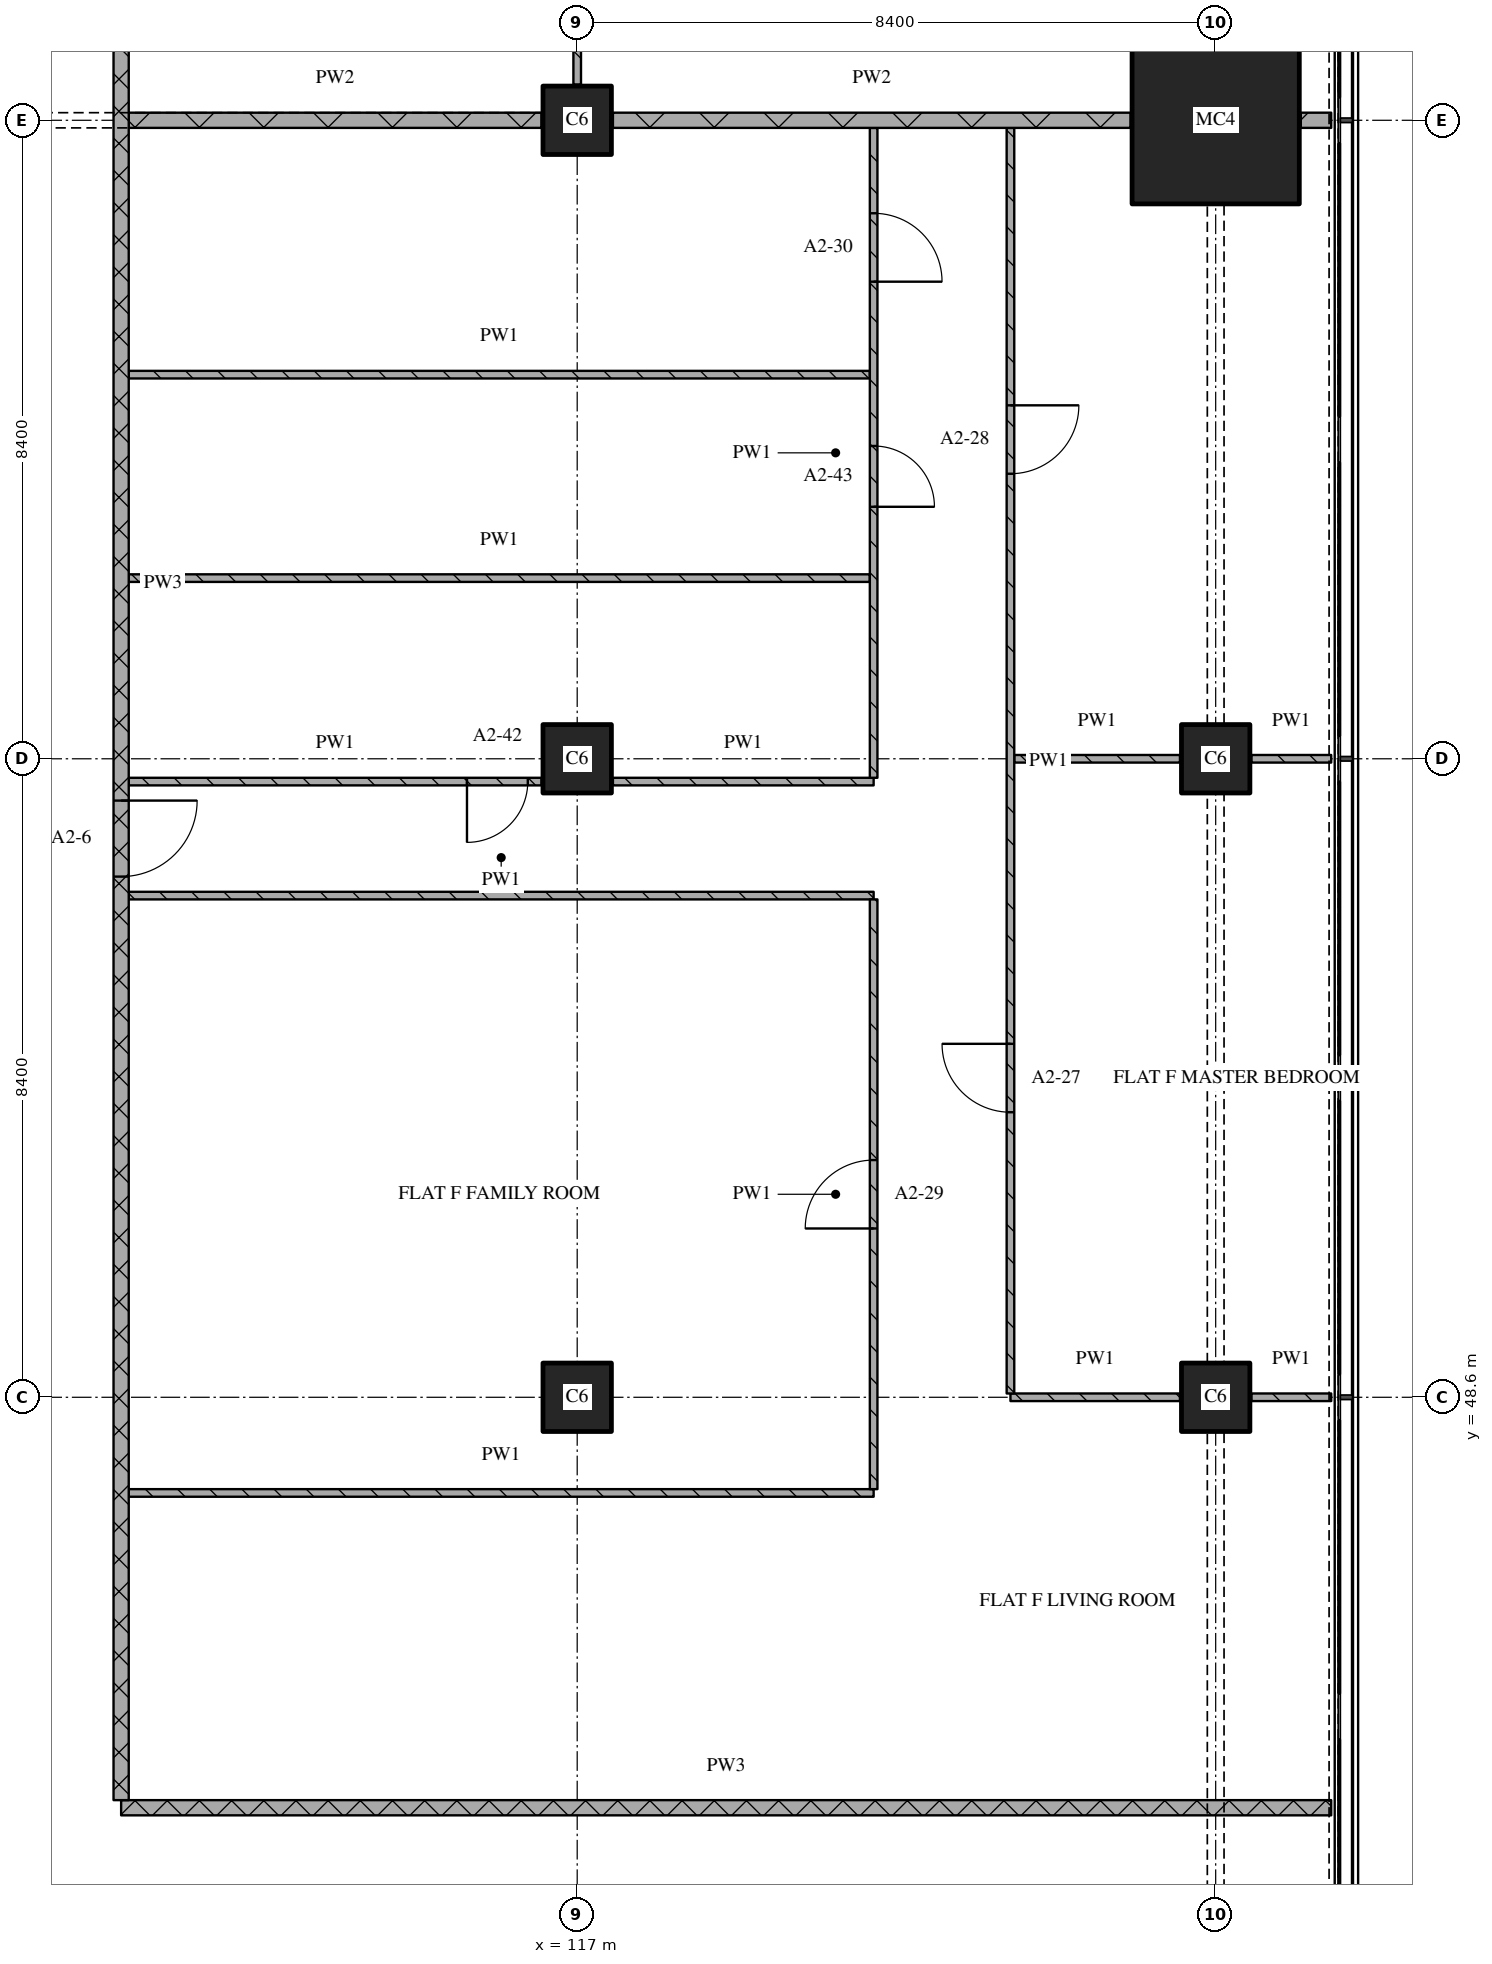
"""IFC4 building model, lengths in metres.
Left out: names, types, materials, properties, quantities, classifications, styles, units other than length and angle.
Written with IfcOpenShell. Run it as: python <this file> out.ifc"""

import sys

from ifc_helpers import new_model, si_unit, direction, frame, frame_2d, origin, origin_2d, place, context, subcontext, project, spatial, rectangle, extrude, element, fill, save


model = new_model("IFC4")
c1 = context("Model", 3, precision=1e-05, world=origin(), true_north=direction((0.0, 1.0)))
c2 = subcontext(c1, "Body", "Model", "MODEL_VIEW")
j1 = project(units=[si_unit("LENGTHUNIT", "METRE"), si_unit("PLANEANGLEUNIT", "RADIAN")], contexts=[c1])
p1 = place(None, origin())
s1 = spatial("IfcSite", under=j1, at=p1, CompositionType="ELEMENT")
p2 = place(p1, origin())
s2 = spatial("IfcBuilding", under=s1, at=p2, CompositionType="ELEMENT")
p3 = place(p2, frame((0.0, 0.0, 51.6)))
s3 = spatial("IfcBuildingStorey", under=s2, at=p3, CompositionType="ELEMENT", Elevation=51.6)
for number, where, z_axis, x_axis in (
    (1, (117.0, 48.6, 0.0), (0.0, 0.0, 1.0), (1.0, 0.0, 0.0)),
    (2, (117.0, 57.0, 0.0), (0.0, 0.0, 1.0), (1.0, 0.0, 0.0)),
    (3, (117.0, 65.4, 0.0), (0.0, 0.0, 1.0), (1.0, 0.0, 0.0)),
    (4, (125.4, 48.6, 0.0), (0.0, 0.0, 1.0), (1.0, 0.0, 0.0)),
    (5, (125.4, 57.0, 0.0), (0.0, 0.0, 1.0), (1.0, 0.0, 0.0)),
):
    element("IfcColumn", number, at=place(p3, frame(where, z_axis=z_axis, x_axis=x_axis)), inside=s3, PredefinedType="COLUMN", context=c2, shape_type="SweptSolid", body=[
        extrude(rectangle(XDim=0.9, YDim=0.9, at=origin_2d()), origin(), (0.0, 0.0, 1.0), 3.6),
    ])
p4 = place(p3, frame((125.4, 65.4, 0.0), z_axis=(0.0, 0.0, 1.0), x_axis=(1.0, 0.0, 0.0)))
e6 = element("IfcColumn", 6, at=p4, inside=s3, PredefinedType="COLUMN", context=c2, shape_type="SweptSolid", body=[
    extrude(rectangle(XDim=2.2, YDim=2.2, at=origin_2d()), origin(), (0.0, 0.0, 1.0), 3.6),
])
p5 = place(p3, frame((111.0, 43.2, 0.0), z_axis=(0.0, 0.0, 1.0), x_axis=(1.0, 0.0, 0.0)))
e7 = element("IfcWall", 7, at=p5, inside=s3, PredefinedType="PARTITIONING", context=c2, shape_type="SweptSolid", body=[
    extrude(rectangle(XDim=15.92, YDim=0.2, at=frame_2d((7.96, 0.0))), origin(), (0.0, 0.0, 1.0), 3.32),
])
p6 = place(p3, frame((111.1, 47.341, 0.0), z_axis=(0.0, 0.0, 1.0), x_axis=(1.0, 0.0, 0.0)))
e8 = element("IfcWall", 8, at=p6, inside=s3, PredefinedType="PARTITIONING", context=c2, shape_type="SweptSolid", body=[
    extrude(rectangle(XDim=9.8, YDim=0.1, at=frame_2d((4.9, 0.0))), origin(), (0.0, 0.0, 1.0), 3.32),
])
p7 = place(p3, frame((122.7, 48.6, 0.0), z_axis=(0.0, 0.0, 1.0), x_axis=(1.0, 0.0, 0.0)))
e9 = element("IfcWall", 9, at=p7, inside=s3, PredefinedType="PARTITIONING", context=c2, shape_type="SweptSolid", body=[
    extrude(rectangle(XDim=2.23, YDim=0.1, at=frame_2d((1.115, 0.0))), origin(), (0.0, 0.0, 1.0), 3.32),
])
p8 = place(p3, frame((125.87, 48.6, 0.0), z_axis=(0.0, 0.0, 1.0), x_axis=(1.0, 0.0, 0.0)))
e10 = element("IfcWall", 10, at=p8, inside=s3, PredefinedType="PARTITIONING", context=c2, shape_type="SweptSolid", body=[
    extrude(rectangle(XDim=1.05, YDim=0.1, at=frame_2d((0.525, 0.0))), origin(), (0.0, 0.0, 1.0), 3.32),
])
p9 = place(p3, frame((111.1, 55.2, 0.0), z_axis=(0.0, 0.0, 1.0), x_axis=(1.0, 0.0, 0.0)))
e11 = element("IfcWall", 11, at=p9, inside=s3, PredefinedType="PARTITIONING", context=c2, shape_type="SweptSolid", body=[
    extrude(rectangle(XDim=9.8, YDim=0.1, at=frame_2d((4.9, 0.0))), origin(), (0.0, 0.0, 1.0), 3.32),
])
p10 = place(p3, frame((111.1, 56.7, 0.0), z_axis=(0.0, 0.0, 1.0), x_axis=(1.0, 0.0, 0.0)))
e12 = element("IfcWall", 12, at=p10, inside=s3, PredefinedType="PARTITIONING", context=c2, shape_type="SweptSolid", body=[
    extrude(rectangle(XDim=5.43, YDim=0.1, at=frame_2d((2.715, 0.0))), origin(), (0.0, 0.0, 1.0), 3.32),
])
p11 = place(p10, frame((4.45, 0.0, 0.0)))
e13 = element("IfcOpeningElement", 13, at=p11, cuts=e12, PredefinedType="OPENING", context=c2, shape_type="SweptSolid", body=[
    extrude(rectangle(XDim=0.8, YDim=2.1, at=frame_2d((0.4, 1.05))), frame((0.0, 0.06, 0.0), z_axis=(0.0, -1.0, 0.0), x_axis=(1.0, 0.0, 0.0)), (0.0, 0.0, 1.0), 0.12),
])
p12 = place(p3, frame((117.47, 56.7, 0.0), z_axis=(0.0, 0.0, 1.0), x_axis=(1.0, 0.0, 0.0)))
e14 = element("IfcWall", 14, at=p12, inside=s3, PredefinedType="PARTITIONING", context=c2, shape_type="SweptSolid", body=[
    extrude(rectangle(XDim=3.43, YDim=0.1, at=frame_2d((1.715, 0.0))), origin(), (0.0, 0.0, 1.0), 3.32),
])
p13 = place(p3, frame((122.75, 57.0, 0.0), z_axis=(0.0, 0.0, 1.0), x_axis=(1.0, 0.0, 0.0)))
e15 = element("IfcWall", 15, at=p13, inside=s3, PredefinedType="PARTITIONING", context=c2, shape_type="SweptSolid", body=[
    extrude(rectangle(XDim=2.18, YDim=0.1, at=frame_2d((1.09, 0.0))), origin(), (0.0, 0.0, 1.0), 3.32),
])
p14 = place(p3, frame((125.87, 57.0, 0.0), z_axis=(0.0, 0.0, 1.0), x_axis=(1.0, 0.0, 0.0)))
e16 = element("IfcWall", 16, at=p14, inside=s3, PredefinedType="PARTITIONING", context=c2, shape_type="SweptSolid", body=[
    extrude(rectangle(XDim=1.05, YDim=0.1, at=frame_2d((0.525, 0.0))), origin(), (0.0, 0.0, 1.0), 3.32),
])
for number, where, z_axis, x_axis in (
    (17, (111.1, 59.377, 0.0), (0.0, 0.0, 1.0), (1.0, 0.0, 0.0)),
    (18, (111.1, 62.053, 0.0), (0.0, 0.0, 1.0), (1.0, 0.0, 0.0)),
):
    element("IfcWall", number, at=place(p3, frame(where, z_axis=z_axis, x_axis=x_axis)), inside=s3, PredefinedType="PARTITIONING", context=c2, shape_type="SweptSolid", body=[
        extrude(rectangle(XDim=9.75, YDim=0.1, at=frame_2d((4.875, 0.0))), origin(), (0.0, 0.0, 1.0), 3.32),
    ])
p15 = place(p3, frame((111.1, 65.4, 0.0), z_axis=(0.0, 0.0, 1.0), x_axis=(1.0, 0.0, 0.0)))
e19 = element("IfcWall", 19, at=p15, inside=s3, PredefinedType="PARTITIONING", context=c2, shape_type="SweptSolid", body=[
    extrude(rectangle(XDim=5.43, YDim=0.2, at=frame_2d((2.715, 0.0))), origin(), (0.0, 0.0, 1.0), 2.82),
])
p16 = place(p3, frame((117.47, 65.4, 0.0), z_axis=(0.0, 0.0, 1.0), x_axis=(1.0, 0.0, 0.0)))
e20 = element("IfcWall", 20, at=p16, inside=s3, PredefinedType="PARTITIONING", context=c2, shape_type="SweptSolid", body=[
    extrude(rectangle(XDim=6.81, YDim=0.2, at=frame_2d((3.405, 0.0))), origin(), (0.0, 0.0, 1.0), 3.32),
])
p17 = place(p3, frame((126.52, 65.4, 0.0), z_axis=(0.0, 0.0, 1.0), x_axis=(1.0, 0.0, 0.0)))
e21 = element("IfcWall", 21, at=p17, inside=s3, PredefinedType="PARTITIONING", context=c2, shape_type="SweptSolid", body=[
    extrude(rectangle(XDim=0.4, YDim=0.2, at=frame_2d((0.2, 0.0))), origin(), (0.0, 0.0, 1.0), 3.32),
])
p18 = place(p3, frame((111.0, 75.32, 0.0), z_axis=(0.0, 0.0, 1.0), x_axis=(0.0, -1.0, 0.0)))
e22 = element("IfcWall", 22, at=p18, inside=s3, PredefinedType="PARTITIONING", context=c2, shape_type="SweptSolid", body=[
    extrude(rectangle(XDim=32.02, YDim=0.2, at=frame_2d((16.01, 0.0))), origin(), (0.0, 0.0, 1.0), 3.32),
])
p19 = place(p18, frame((4.47, 0.0, 0.0)))
e23 = element("IfcOpeningElement", 23, at=p19, cuts=e22, PredefinedType="OPENING", context=c2, shape_type="SweptSolid", body=[
    extrude(rectangle(XDim=1.0, YDim=2.1, at=frame_2d((0.5, 1.05))), frame((0.0, 0.11, 0.0), z_axis=(0.0, -1.0, 0.0), x_axis=(1.0, 0.0, 0.0)), (0.0, 0.0, 1.0), 0.22),
])
p20 = place(p18, frame((18.87, 0.0, 0.0)))
e24 = element("IfcOpeningElement", 24, at=p20, cuts=e22, PredefinedType="OPENING", context=c2, shape_type="SweptSolid", body=[
    extrude(rectangle(XDim=1.0, YDim=2.1, at=frame_2d((0.5, 1.05))), frame((0.0, 0.11, 0.0), z_axis=(0.0, -1.0, 0.0), x_axis=(1.0, 0.0, 0.0)), (0.0, 0.0, 1.0), 0.22),
])
p21 = place(p3, frame((117.0, 65.87, 0.0), z_axis=(0.0, 0.0, 1.0), x_axis=(0.0, 1.0, 0.0)))
e25 = element("IfcWall", 25, at=p21, inside=s3, PredefinedType="PARTITIONING", context=c2, shape_type="SweptSolid", body=[
    extrude(rectangle(XDim=3.68, YDim=0.1, at=frame_2d((1.84, 0.0))), origin(), (0.0, 0.0, 1.0), 3.32),
])
p22 = place(p21, frame((1.23, 0.0, 0.0)))
e26 = element("IfcOpeningElement", 26, at=p22, cuts=e25, PredefinedType="OPENING", context=c2, shape_type="SweptSolid", body=[
    extrude(rectangle(XDim=0.8, YDim=2.1, at=frame_2d((0.4, 1.05))), frame((0.0, 0.06, 0.0), z_axis=(0.0, -1.0, 0.0), x_axis=(1.0, 0.0, 0.0)), (0.0, 0.0, 1.0), 0.12),
])
p23 = place(p3, frame((120.9, 47.391, 0.0), z_axis=(0.0, 0.0, 1.0), x_axis=(0.0, 1.0, 0.0)))
e27 = element("IfcWall", 27, at=p23, inside=s3, PredefinedType="PARTITIONING", context=c2, shape_type="SweptSolid", body=[
    extrude(rectangle(XDim=7.759, YDim=0.1, at=frame_2d((3.879, 0.0))), origin(), (0.0, 0.0, 1.0), 3.32),
])
p24 = place(p23, frame((3.429, 0.0, 0.0)))
e28 = element("IfcOpeningElement", 28, at=p24, cuts=e27, PredefinedType="OPENING", context=c2, shape_type="SweptSolid", body=[
    extrude(rectangle(XDim=0.9, YDim=2.1, at=frame_2d((0.45, 1.05))), frame((0.0, 0.06, 0.0), z_axis=(0.0, -1.0, 0.0), x_axis=(1.0, 0.0, 0.0)), (0.0, 0.0, 1.0), 0.12),
])
p25 = place(p3, frame((120.9, 56.75, 0.0), z_axis=(0.0, 0.0, 1.0), x_axis=(0.0, 1.0, 0.0)))
e29 = element("IfcWall", 29, at=p25, inside=s3, PredefinedType="PARTITIONING", context=c2, shape_type="SweptSolid", body=[
    extrude(rectangle(XDim=8.55, YDim=0.1, at=frame_2d((4.275, 0.0))), origin(), (0.0, 0.0, 1.0), 3.32),
])
p26 = place(p25, frame((3.565, 0.0, 0.0)))
e30 = element("IfcOpeningElement", 30, at=p26, cuts=e29, PredefinedType="OPENING", context=c2, shape_type="SweptSolid", body=[
    extrude(rectangle(XDim=0.8, YDim=2.1, at=frame_2d((0.4, 1.05))), frame((0.0, 0.06, 0.0), z_axis=(0.0, -1.0, 0.0), x_axis=(1.0, 0.0, 0.0)), (0.0, 0.0, 1.0), 0.12),
])
p27 = place(p25, frame((6.527, 0.0, 0.0)))
e31 = element("IfcOpeningElement", 31, at=p27, cuts=e29, PredefinedType="OPENING", context=c2, shape_type="SweptSolid", body=[
    extrude(rectangle(XDim=0.9, YDim=2.1, at=frame_2d((0.45, 1.05))), frame((0.0, 0.06, 0.0), z_axis=(0.0, -1.0, 0.0), x_axis=(1.0, 0.0, 0.0)), (0.0, 0.0, 1.0), 0.12),
])
p28 = place(p3, frame((122.7, 65.3, 0.0), z_axis=(0.0, 0.0, 1.0), x_axis=(0.0, -1.0, 0.0)))
e32 = element("IfcWall", 32, at=p28, inside=s3, PredefinedType="PARTITIONING", context=c2, shape_type="SweptSolid", body=[
    extrude(rectangle(XDim=16.65, YDim=0.1, at=frame_2d((8.325, 0.0))), origin(), (0.0, 0.0, 1.0), 3.32),
])
p29 = place(p28, frame((3.65, 0.0, 0.0)))
e33 = element("IfcOpeningElement", 33, at=p29, cuts=e32, PredefinedType="OPENING", context=c2, shape_type="SweptSolid", body=[
    extrude(rectangle(XDim=0.9, YDim=2.1, at=frame_2d((0.45, 1.05))), frame((0.0, 0.06, 0.0), z_axis=(0.0, -1.0, 0.0), x_axis=(1.0, 0.0, 0.0)), (0.0, 0.0, 1.0), 0.12),
])
p30 = place(p28, frame((12.05, 0.0, 0.0)))
e34 = element("IfcOpeningElement", 34, at=p30, cuts=e32, PredefinedType="OPENING", context=c2, shape_type="SweptSolid", body=[
    extrude(rectangle(XDim=0.9, YDim=2.1, at=frame_2d((0.45, 1.05))), frame((0.0, 0.06, 0.0), z_axis=(0.0, -1.0, 0.0), x_axis=(1.0, 0.0, 0.0)), (0.0, 0.0, 1.0), 0.12),
])
p31 = place(p11, origin())
e35 = element("IfcDoor", 35, at=p31, inside=s3, OperationType="SINGLE_SWING_RIGHT", PredefinedType="DOOR", context=c2, shape_type="SweptSolid", body=[
    extrude(rectangle(XDim=0.8, YDim=2.1, at=frame_2d((0.4, 1.05))), frame((0.0, 0.025, 0.0), z_axis=(0.0, -1.0, 0.0), x_axis=(1.0, 0.0, 0.0)), (0.0, 0.0, 1.0), 0.05),
])
fill(e13, e35)
p32 = place(p20, origin())
e36 = element("IfcDoor", 36, at=p32, inside=s3, OperationType="SINGLE_SWING_LEFT", PredefinedType="DOOR", context=c2, shape_type="SweptSolid", body=[
    extrude(rectangle(XDim=1.0, YDim=2.1, at=frame_2d((0.5, 1.05))), frame((0.0, 0.025, 0.0), z_axis=(0.0, -1.0, 0.0), x_axis=(1.0, 0.0, 0.0)), (0.0, 0.0, 1.0), 0.05),
])
fill(e24, e36)
p33 = place(p24, origin())
e37 = element("IfcDoor", 37, at=p33, inside=s3, OperationType="SINGLE_SWING_LEFT", PredefinedType="DOOR", context=c2, shape_type="SweptSolid", body=[
    extrude(rectangle(XDim=0.9, YDim=2.1, at=frame_2d((0.45, 1.05))), frame((0.0, 0.025, 0.0), z_axis=(0.0, -1.0, 0.0), x_axis=(1.0, 0.0, 0.0)), (0.0, 0.0, 1.0), 0.05),
])
fill(e28, e37)
p34 = place(p26, origin())
e38 = element("IfcDoor", 38, at=p34, inside=s3, OperationType="SINGLE_SWING_RIGHT", PredefinedType="DOOR", context=c2, shape_type="SweptSolid", body=[
    extrude(rectangle(XDim=0.8, YDim=2.1, at=frame_2d((0.4, 1.05))), frame((0.0, 0.025, 0.0), z_axis=(0.0, -1.0, 0.0), x_axis=(1.0, 0.0, 0.0)), (0.0, 0.0, 1.0), 0.05),
])
fill(e30, e38)
p35 = place(p27, origin())
e39 = element("IfcDoor", 39, at=p35, inside=s3, OperationType="SINGLE_SWING_RIGHT", PredefinedType="DOOR", context=c2, shape_type="SweptSolid", body=[
    extrude(rectangle(XDim=0.9, YDim=2.1, at=frame_2d((0.45, 1.05))), frame((0.0, 0.025, 0.0), z_axis=(0.0, -1.0, 0.0), x_axis=(1.0, 0.0, 0.0)), (0.0, 0.0, 1.0), 0.05),
])
fill(e31, e39)
p36 = place(p29, origin())
e40 = element("IfcDoor", 40, at=p36, inside=s3, OperationType="SINGLE_SWING_LEFT", PredefinedType="DOOR", context=c2, shape_type="SweptSolid", body=[
    extrude(rectangle(XDim=0.9, YDim=2.1, at=frame_2d((0.45, 1.05))), frame((0.0, 0.025, 0.0), z_axis=(0.0, -1.0, 0.0), x_axis=(1.0, 0.0, 0.0)), (0.0, 0.0, 1.0), 0.05),
])
fill(e33, e40)
p37 = place(p30, origin())
e41 = element("IfcDoor", 41, at=p37, inside=s3, OperationType="SINGLE_SWING_RIGHT", PredefinedType="DOOR", context=c2, shape_type="SweptSolid", body=[
    extrude(rectangle(XDim=0.9, YDim=2.1, at=frame_2d((0.45, 1.05))), frame((0.0, 0.025, 0.0), z_axis=(0.0, -1.0, 0.0), x_axis=(1.0, 0.0, 0.0)), (0.0, 0.0, 1.0), 0.05),
])
fill(e34, e41)
save(model, sys.argv[1])
